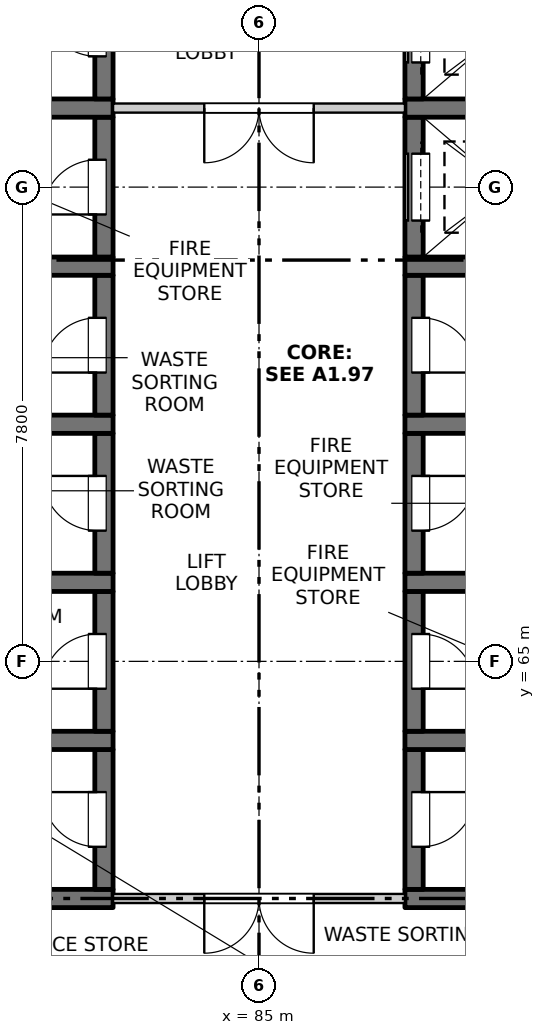
"""IFC4 building model, lengths in metres.
Left out: names, types, materials, properties, quantities, classifications, styles, units other than length and angle.
Written with IfcOpenShell. Run it as: python <this file> out.ifc"""

import sys

from ifc_helpers import new_model, si_unit, direction, frame, frame_2d, origin, place, context, subcontext, project, spatial, rectangle, extrude, element, fill, save


model = new_model("IFC4")
c1 = context("Model", 3, precision=1e-05, world=origin(), true_north=direction((0.0, 1.0)))
c2 = subcontext(c1, "Body", "Model", "MODEL_VIEW")
j1 = project(units=[si_unit("LENGTHUNIT", "METRE"), si_unit("PLANEANGLEUNIT", "RADIAN")], contexts=[c1])
p1 = place(None, origin())
s1 = spatial("IfcSite", under=j1, at=p1, CompositionType="ELEMENT")
p2 = place(p1, origin())
s2 = spatial("IfcBuilding", under=s1, at=p2, CompositionType="ELEMENT")
p3 = place(p2, frame((0.0, 0.0, 182.6)))
s3 = spatial("IfcBuildingStorey", under=s2, at=p3, CompositionType="ELEMENT", Elevation=182.6)
p4 = place(p3, frame((79.6, 61.1, -0.25), z_axis=(0.0, 0.0, 1.0), x_axis=(1.0, 0.0, 0.0)))
e1 = element("IfcWall", 1, at=p4, inside=s3, PredefinedType="SOLIDWALL", context=c2, shape_type="SweptSolid", body=[
    extrude(rectangle(XDim=3.0, YDim=0.3, at=frame_2d((1.5, 0.0))), origin(), (0.0, 0.0, 1.0), 3.4),
])
p5 = place(p3, frame((82.45, 61.25, -0.25), z_axis=(0.0, 0.0, 1.0), x_axis=(0.0, 1.0, 0.0)))
e2 = element("IfcWall", 2, at=p5, inside=s3, PredefinedType="SOLIDWALL", context=c2, shape_type="SweptSolid", body=[
    extrude(rectangle(XDim=2.3, YDim=0.3, at=frame_2d((1.15, 0.0))), origin(), (0.0, 0.0, 1.0), 3.4),
])
p6 = place(p5, frame((0.7, 0.0, 0.25)))
e3 = element("IfcOpeningElement", 3, at=p6, cuts=e2, PredefinedType="OPENING", context=c2, shape_type="SweptSolid", body=[
    extrude(rectangle(XDim=0.9, YDim=2.1, at=frame_2d((0.45, 1.05))), frame((0.0, 0.16, 0.0), z_axis=(0.0, -1.0, 0.0), x_axis=(1.0, 0.0, 0.0)), (0.0, 0.0, 1.0), 0.32),
])
p7 = place(p3, frame((79.6, 63.7, -0.25), z_axis=(0.0, 0.0, 1.0), x_axis=(1.0, 0.0, 0.0)))
e4 = element("IfcWall", 4, at=p7, inside=s3, PredefinedType="SOLIDWALL", context=c2, shape_type="SweptSolid", body=[
    extrude(rectangle(XDim=3.0, YDim=0.3, at=frame_2d((1.5, 0.0))), origin(), (0.0, 0.0, 1.0), 3.4),
])
p8 = place(p3, frame((82.45, 63.85, -0.25), z_axis=(0.0, 0.0, 1.0), x_axis=(0.0, 1.0, 0.0)))
e5 = element("IfcWall", 5, at=p8, inside=s3, PredefinedType="SOLIDWALL", context=c2, shape_type="SweptSolid", body=[
    extrude(rectangle(XDim=2.3, YDim=0.3, at=frame_2d((1.15, 0.0))), origin(), (0.0, 0.0, 1.0), 3.4),
])
p9 = place(p8, frame((0.7, 0.0, 0.25)))
e6 = element("IfcOpeningElement", 6, at=p9, cuts=e5, PredefinedType="OPENING", context=c2, shape_type="SweptSolid", body=[
    extrude(rectangle(XDim=0.9, YDim=2.1, at=frame_2d((0.45, 1.05))), frame((0.0, 0.16, 0.0), z_axis=(0.0, -1.0, 0.0), x_axis=(1.0, 0.0, 0.0)), (0.0, 0.0, 1.0), 0.32),
])
p10 = place(p3, frame((79.6, 66.3, -0.25), z_axis=(0.0, 0.0, 1.0), x_axis=(1.0, 0.0, 0.0)))
e7 = element("IfcWall", 7, at=p10, inside=s3, PredefinedType="SOLIDWALL", context=c2, shape_type="SweptSolid", body=[
    extrude(rectangle(XDim=3.0, YDim=0.3, at=frame_2d((1.5, 0.0))), origin(), (0.0, 0.0, 1.0), 3.4),
])
p11 = place(p3, frame((82.45, 66.45, -0.25), z_axis=(0.0, 0.0, 1.0), x_axis=(0.0, 1.0, 0.0)))
e8 = element("IfcWall", 8, at=p11, inside=s3, PredefinedType="SOLIDWALL", context=c2, shape_type="SweptSolid", body=[
    extrude(rectangle(XDim=2.3, YDim=0.3, at=frame_2d((1.15, 0.0))), origin(), (0.0, 0.0, 1.0), 3.4),
])
p12 = place(p11, frame((0.7, 0.0, 0.25)))
e9 = element("IfcOpeningElement", 9, at=p12, cuts=e8, PredefinedType="OPENING", context=c2, shape_type="SweptSolid", body=[
    extrude(rectangle(XDim=0.9, YDim=2.1, at=frame_2d((0.45, 1.05))), frame((0.0, 0.16, 0.0), z_axis=(0.0, -1.0, 0.0), x_axis=(1.0, 0.0, 0.0)), (0.0, 0.0, 1.0), 0.32),
])
p13 = place(p3, frame((79.6, 68.9, -0.25), z_axis=(0.0, 0.0, 1.0), x_axis=(1.0, 0.0, 0.0)))
e10 = element("IfcWall", 10, at=p13, inside=s3, PredefinedType="SOLIDWALL", context=c2, shape_type="SweptSolid", body=[
    extrude(rectangle(XDim=3.0, YDim=0.3, at=frame_2d((1.5, 0.0))), origin(), (0.0, 0.0, 1.0), 3.4),
])
p14 = place(p3, frame((82.45, 69.05, -0.25), z_axis=(0.0, 0.0, 1.0), x_axis=(0.0, 1.0, 0.0)))
e11 = element("IfcWall", 11, at=p14, inside=s3, PredefinedType="SOLIDWALL", context=c2, shape_type="SweptSolid", body=[
    extrude(rectangle(XDim=2.3, YDim=0.3, at=frame_2d((1.15, 0.0))), origin(), (0.0, 0.0, 1.0), 3.4),
])
p15 = place(p14, frame((0.7, 0.0, 0.25)))
e12 = element("IfcOpeningElement", 12, at=p15, cuts=e11, PredefinedType="OPENING", context=c2, shape_type="SweptSolid", body=[
    extrude(rectangle(XDim=0.9, YDim=2.1, at=frame_2d((0.45, 1.05))), frame((0.0, 0.16, 0.0), z_axis=(0.0, -1.0, 0.0), x_axis=(1.0, 0.0, 0.0)), (0.0, 0.0, 1.0), 0.32),
])
p16 = place(p3, frame((79.6, 71.5, -0.25), z_axis=(0.0, 0.0, 1.0), x_axis=(1.0, 0.0, 0.0)))
e13 = element("IfcWall", 13, at=p16, inside=s3, PredefinedType="SOLIDWALL", context=c2, shape_type="SweptSolid", body=[
    extrude(rectangle(XDim=3.0, YDim=0.3, at=frame_2d((1.5, 0.0))), origin(), (0.0, 0.0, 1.0), 3.4),
])
p17 = place(p3, frame((82.45, 71.65, -0.25), z_axis=(0.0, 0.0, 1.0), x_axis=(0.0, 1.0, 0.0)))
e14 = element("IfcWall", 14, at=p17, inside=s3, PredefinedType="SOLIDWALL", context=c2, shape_type="SweptSolid", body=[
    extrude(rectangle(XDim=2.3, YDim=0.3, at=frame_2d((1.15, 0.0))), origin(), (0.0, 0.0, 1.0), 3.4),
])
p18 = place(p17, frame((0.7, 0.0, 0.25)))
e15 = element("IfcOpeningElement", 15, at=p18, cuts=e14, PredefinedType="OPENING", context=c2, shape_type="SweptSolid", body=[
    extrude(rectangle(XDim=0.9, YDim=2.1, at=frame_2d((0.45, 1.05))), frame((0.0, 0.16, 0.0), z_axis=(0.0, -1.0, 0.0), x_axis=(1.0, 0.0, 0.0)), (0.0, 0.0, 1.0), 0.32),
])
p19 = place(p3, frame((79.6, 74.1, -0.25), z_axis=(0.0, 0.0, 1.0), x_axis=(1.0, 0.0, 0.0)))
e16 = element("IfcWall", 16, at=p19, inside=s3, PredefinedType="SOLIDWALL", context=c2, shape_type="SweptSolid", body=[
    extrude(rectangle(XDim=3.0, YDim=0.3, at=frame_2d((1.5, 0.0))), origin(), (0.0, 0.0, 1.0), 3.4),
])
p20 = place(p3, frame((82.45, 74.25, -0.25), z_axis=(0.0, 0.0, 1.0), x_axis=(0.0, 1.0, 0.0)))
e17 = element("IfcWall", 17, at=p20, inside=s3, PredefinedType="SOLIDWALL", context=c2, shape_type="SweptSolid", body=[
    extrude(rectangle(XDim=2.3, YDim=0.3, at=frame_2d((1.15, 0.0))), origin(), (0.0, 0.0, 1.0), 3.4),
])
p21 = place(p20, frame((0.7, 0.0, 0.25)))
e18 = element("IfcOpeningElement", 18, at=p21, cuts=e17, PredefinedType="OPENING", context=c2, shape_type="SweptSolid", body=[
    extrude(rectangle(XDim=0.9, YDim=2.1, at=frame_2d((0.45, 1.05))), frame((0.0, 0.16, 0.0), z_axis=(0.0, -1.0, 0.0), x_axis=(1.0, 0.0, 0.0)), (0.0, 0.0, 1.0), 0.32),
])
p22 = place(p3, frame((87.4, 61.1, -0.25), z_axis=(0.0, 0.0, 1.0), x_axis=(1.0, 0.0, 0.0)))
e19 = element("IfcWall", 19, at=p22, inside=s3, PredefinedType="SOLIDWALL", context=c2, shape_type="SweptSolid", body=[
    extrude(rectangle(XDim=3.0, YDim=0.3, at=frame_2d((1.5, 0.0))), origin(), (0.0, 0.0, 1.0), 3.4),
])
p23 = place(p3, frame((87.55, 61.25, -0.25), z_axis=(0.0, 0.0, 1.0), x_axis=(0.0, 1.0, 0.0)))
e20 = element("IfcWall", 20, at=p23, inside=s3, PredefinedType="SOLIDWALL", context=c2, shape_type="SweptSolid", body=[
    extrude(rectangle(XDim=2.3, YDim=0.3, at=frame_2d((1.15, 0.0))), origin(), (0.0, 0.0, 1.0), 3.4),
])
p24 = place(p23, frame((0.7, 0.0, 0.25)))
e21 = element("IfcOpeningElement", 21, at=p24, cuts=e20, PredefinedType="OPENING", context=c2, shape_type="SweptSolid", body=[
    extrude(rectangle(XDim=0.9, YDim=2.1, at=frame_2d((0.45, 1.05))), frame((0.0, 0.16, 0.0), z_axis=(0.0, -1.0, 0.0), x_axis=(1.0, 0.0, 0.0)), (0.0, 0.0, 1.0), 0.32),
])
p25 = place(p3, frame((87.4, 63.7, -0.25), z_axis=(0.0, 0.0, 1.0), x_axis=(1.0, 0.0, 0.0)))
e22 = element("IfcWall", 22, at=p25, inside=s3, PredefinedType="SOLIDWALL", context=c2, shape_type="SweptSolid", body=[
    extrude(rectangle(XDim=3.0, YDim=0.3, at=frame_2d((1.5, 0.0))), origin(), (0.0, 0.0, 1.0), 3.4),
])
p26 = place(p3, frame((87.55, 63.85, -0.25), z_axis=(0.0, 0.0, 1.0), x_axis=(0.0, 1.0, 0.0)))
e23 = element("IfcWall", 23, at=p26, inside=s3, PredefinedType="SOLIDWALL", context=c2, shape_type="SweptSolid", body=[
    extrude(rectangle(XDim=2.3, YDim=0.3, at=frame_2d((1.15, 0.0))), origin(), (0.0, 0.0, 1.0), 3.4),
])
p27 = place(p26, frame((0.7, 0.0, 0.25)))
e24 = element("IfcOpeningElement", 24, at=p27, cuts=e23, PredefinedType="OPENING", context=c2, shape_type="SweptSolid", body=[
    extrude(rectangle(XDim=0.9, YDim=2.1, at=frame_2d((0.45, 1.05))), frame((0.0, 0.16, 0.0), z_axis=(0.0, -1.0, 0.0), x_axis=(1.0, 0.0, 0.0)), (0.0, 0.0, 1.0), 0.32),
])
p28 = place(p3, frame((87.4, 66.3, -0.25), z_axis=(0.0, 0.0, 1.0), x_axis=(1.0, 0.0, 0.0)))
e25 = element("IfcWall", 25, at=p28, inside=s3, PredefinedType="SOLIDWALL", context=c2, shape_type="SweptSolid", body=[
    extrude(rectangle(XDim=3.0, YDim=0.3, at=frame_2d((1.5, 0.0))), origin(), (0.0, 0.0, 1.0), 3.4),
])
p29 = place(p3, frame((87.55, 66.45, -0.25), z_axis=(0.0, 0.0, 1.0), x_axis=(0.0, 1.0, 0.0)))
e26 = element("IfcWall", 26, at=p29, inside=s3, PredefinedType="SOLIDWALL", context=c2, shape_type="SweptSolid", body=[
    extrude(rectangle(XDim=2.3, YDim=0.3, at=frame_2d((1.15, 0.0))), origin(), (0.0, 0.0, 1.0), 3.4),
])
p30 = place(p29, frame((0.7, 0.0, 0.25)))
e27 = element("IfcOpeningElement", 27, at=p30, cuts=e26, PredefinedType="OPENING", context=c2, shape_type="SweptSolid", body=[
    extrude(rectangle(XDim=0.9, YDim=2.1, at=frame_2d((0.45, 1.05))), frame((0.0, 0.16, 0.0), z_axis=(0.0, -1.0, 0.0), x_axis=(1.0, 0.0, 0.0)), (0.0, 0.0, 1.0), 0.32),
])
p31 = place(p3, frame((87.4, 68.9, -0.25), z_axis=(0.0, 0.0, 1.0), x_axis=(1.0, 0.0, 0.0)))
e28 = element("IfcWall", 28, at=p31, inside=s3, PredefinedType="SOLIDWALL", context=c2, shape_type="SweptSolid", body=[
    extrude(rectangle(XDim=3.0, YDim=0.3, at=frame_2d((1.5, 0.0))), origin(), (0.0, 0.0, 1.0), 3.4),
])
p32 = place(p3, frame((87.55, 69.05, -0.25), z_axis=(0.0, 0.0, 1.0), x_axis=(0.0, 1.0, 0.0)))
e29 = element("IfcWall", 29, at=p32, inside=s3, PredefinedType="SOLIDWALL", context=c2, shape_type="SweptSolid", body=[
    extrude(rectangle(XDim=2.3, YDim=0.3, at=frame_2d((1.15, 0.0))), origin(), (0.0, 0.0, 1.0), 3.4),
])
p33 = place(p32, frame((0.7, 0.0, 0.25)))
e30 = element("IfcOpeningElement", 30, at=p33, cuts=e29, PredefinedType="OPENING", context=c2, shape_type="SweptSolid", body=[
    extrude(rectangle(XDim=0.9, YDim=2.1, at=frame_2d((0.45, 1.05))), frame((0.0, 0.16, 0.0), z_axis=(0.0, -1.0, 0.0), x_axis=(1.0, 0.0, 0.0)), (0.0, 0.0, 1.0), 0.32),
])
p34 = place(p3, frame((87.4, 71.5, -0.25), z_axis=(0.0, 0.0, 1.0), x_axis=(1.0, 0.0, 0.0)))
e31 = element("IfcWall", 31, at=p34, inside=s3, PredefinedType="SOLIDWALL", context=c2, shape_type="SweptSolid", body=[
    extrude(rectangle(XDim=3.0, YDim=0.3, at=frame_2d((1.5, 0.0))), origin(), (0.0, 0.0, 1.0), 3.4),
])
p35 = place(p3, frame((87.55, 71.65, -0.25), z_axis=(0.0, 0.0, 1.0), x_axis=(0.0, 1.0, 0.0)))
e32 = element("IfcWall", 32, at=p35, inside=s3, PredefinedType="SOLIDWALL", context=c2, shape_type="SweptSolid", body=[
    extrude(rectangle(XDim=2.3, YDim=0.3, at=frame_2d((1.15, 0.0))), origin(), (0.0, 0.0, 1.0), 3.4),
])
p36 = place(p35, frame((0.6, 0.0, 0.25)))
e33 = element("IfcOpeningElement", 33, at=p36, cuts=e32, PredefinedType="OPENING", context=c2, shape_type="SweptSolid", body=[
    extrude(rectangle(XDim=1.1, YDim=2.1, at=frame_2d((0.55, 1.05))), frame((0.0, 0.16, 0.0), z_axis=(0.0, -1.0, 0.0), x_axis=(1.0, 0.0, 0.0)), (0.0, 0.0, 1.0), 0.32),
])
p37 = place(p3, frame((87.4, 74.1, -0.25), z_axis=(0.0, 0.0, 1.0), x_axis=(1.0, 0.0, 0.0)))
e34 = element("IfcWall", 34, at=p37, inside=s3, PredefinedType="SOLIDWALL", context=c2, shape_type="SweptSolid", body=[
    extrude(rectangle(XDim=3.0, YDim=0.3, at=frame_2d((1.5, 0.0))), origin(), (0.0, 0.0, 1.0), 3.4),
])
p38 = place(p3, frame((87.55, 74.25, -0.25), z_axis=(0.0, 0.0, 1.0), x_axis=(0.0, 1.0, 0.0)))
e35 = element("IfcWall", 35, at=p38, inside=s3, PredefinedType="SOLIDWALL", context=c2, shape_type="SweptSolid", body=[
    extrude(rectangle(XDim=2.3, YDim=0.3, at=frame_2d((1.15, 0.0))), origin(), (0.0, 0.0, 1.0), 3.4),
])
p39 = place(p38, frame((0.6, 0.0, 0.25)))
e36 = element("IfcOpeningElement", 36, at=p39, cuts=e35, PredefinedType="OPENING", context=c2, shape_type="SweptSolid", body=[
    extrude(rectangle(XDim=1.1, YDim=2.1, at=frame_2d((0.55, 1.05))), frame((0.0, 0.16, 0.0), z_axis=(0.0, -1.0, 0.0), x_axis=(1.0, 0.0, 0.0)), (0.0, 0.0, 1.0), 0.32),
])
p40 = place(p3, frame((82.6, 61.1, 0.0), z_axis=(0.0, 0.0, 1.0), x_axis=(1.0, 0.0, 0.0)))
e37 = element("IfcWall", 37, at=p40, inside=s3, PredefinedType="PARTITIONING", context=c2, shape_type="SweptSolid", body=[
    extrude(rectangle(XDim=4.8, YDim=0.15, at=frame_2d((2.4, 0.0))), origin(), (0.0, 0.0, 1.0), 3.15),
])
p41 = place(p40, frame((1.5, 0.0, 0.0)))
e38 = element("IfcOpeningElement", 38, at=p41, cuts=e37, PredefinedType="OPENING", context=c2, shape_type="SweptSolid", body=[
    extrude(rectangle(XDim=1.8, YDim=2.1, at=frame_2d((0.9, 1.05))), frame((0.0, 0.085, 0.0), z_axis=(0.0, -1.0, 0.0), x_axis=(1.0, 0.0, 0.0)), (0.0, 0.0, 1.0), 0.17),
])
p42 = place(p3, frame((82.6, 74.1, 0.0), z_axis=(0.0, 0.0, 1.0), x_axis=(1.0, 0.0, 0.0)))
e39 = element("IfcWall", 39, at=p42, inside=s3, PredefinedType="PARTITIONING", context=c2, shape_type="SweptSolid", body=[
    extrude(rectangle(XDim=4.8, YDim=0.15, at=frame_2d((2.4, 0.0))), origin(), (0.0, 0.0, 1.0), 3.15),
])
p43 = place(p42, frame((1.5, 0.0, 0.0)))
e40 = element("IfcOpeningElement", 40, at=p43, cuts=e39, PredefinedType="OPENING", context=c2, shape_type="SweptSolid", body=[
    extrude(rectangle(XDim=1.8, YDim=2.1, at=frame_2d((0.9, 1.05))), frame((0.0, 0.085, 0.0), z_axis=(0.0, -1.0, 0.0), x_axis=(1.0, 0.0, 0.0)), (0.0, 0.0, 1.0), 0.17),
])
p44 = place(p41, origin())
e41 = element("IfcDoor", 41, at=p44, inside=s3, OperationType="DOUBLE_DOOR_SINGLE_SWING", PredefinedType="DOOR", context=c2, shape_type="SweptSolid", body=[
    extrude(rectangle(XDim=1.8, YDim=2.1, at=frame_2d((0.9, 1.05))), frame((0.0, 0.025, 0.0), z_axis=(0.0, -1.0, 0.0), x_axis=(1.0, 0.0, 0.0)), (0.0, 0.0, 1.0), 0.05),
])
fill(e38, e41)
p45 = place(p6, origin())
e42 = element("IfcDoor", 42, at=p45, inside=s3, OperationType="SINGLE_SWING_RIGHT", PredefinedType="DOOR", context=c2, shape_type="SweptSolid", body=[
    extrude(rectangle(XDim=0.9, YDim=2.1, at=frame_2d((0.45, 1.05))), frame((0.0, 0.135, 0.0), z_axis=(0.0, -1.0, 0.0), x_axis=(1.0, 0.0, 0.0)), (0.0, 0.0, 1.0), 0.05),
])
fill(e3, e42)
p46 = place(p24, origin())
e43 = element("IfcDoor", 43, at=p46, inside=s3, OperationType="SINGLE_SWING_LEFT", PredefinedType="DOOR", context=c2, shape_type="SweptSolid", body=[
    extrude(rectangle(XDim=0.9, YDim=2.1, at=frame_2d((0.45, 1.05))), frame((0.0, -0.085, 0.0), z_axis=(0.0, -1.0, 0.0), x_axis=(1.0, 0.0, 0.0)), (0.0, 0.0, 1.0), 0.05),
])
fill(e21, e43)
p47 = place(p9, origin())
e44 = element("IfcDoor", 44, at=p47, inside=s3, OperationType="SINGLE_SWING_LEFT", PredefinedType="DOOR", context=c2, shape_type="SweptSolid", body=[
    extrude(rectangle(XDim=0.9, YDim=2.1, at=frame_2d((0.45, 1.05))), frame((0.0, 0.135, 0.0), z_axis=(0.0, -1.0, 0.0), x_axis=(1.0, 0.0, 0.0)), (0.0, 0.0, 1.0), 0.05),
])
fill(e6, e44)
p48 = place(p27, origin())
e45 = element("IfcDoor", 45, at=p48, inside=s3, OperationType="SINGLE_SWING_RIGHT", PredefinedType="DOOR", context=c2, shape_type="SweptSolid", body=[
    extrude(rectangle(XDim=0.9, YDim=2.1, at=frame_2d((0.45, 1.05))), frame((0.0, -0.085, 0.0), z_axis=(0.0, -1.0, 0.0), x_axis=(1.0, 0.0, 0.0)), (0.0, 0.0, 1.0), 0.05),
])
fill(e24, e45)
p49 = place(p12, origin())
e46 = element("IfcDoor", 46, at=p49, inside=s3, OperationType="SINGLE_SWING_RIGHT", PredefinedType="DOOR", context=c2, shape_type="SweptSolid", body=[
    extrude(rectangle(XDim=0.9, YDim=2.1, at=frame_2d((0.45, 1.05))), frame((0.0, 0.135, 0.0), z_axis=(0.0, -1.0, 0.0), x_axis=(1.0, 0.0, 0.0)), (0.0, 0.0, 1.0), 0.05),
])
fill(e9, e46)
p50 = place(p30, origin())
e47 = element("IfcDoor", 47, at=p50, inside=s3, OperationType="SINGLE_SWING_LEFT", PredefinedType="DOOR", context=c2, shape_type="SweptSolid", body=[
    extrude(rectangle(XDim=0.9, YDim=2.1, at=frame_2d((0.45, 1.05))), frame((0.0, -0.085, 0.0), z_axis=(0.0, -1.0, 0.0), x_axis=(1.0, 0.0, 0.0)), (0.0, 0.0, 1.0), 0.05),
])
fill(e27, e47)
p51 = place(p15, origin())
e48 = element("IfcDoor", 48, at=p51, inside=s3, OperationType="SINGLE_SWING_LEFT", PredefinedType="DOOR", context=c2, shape_type="SweptSolid", body=[
    extrude(rectangle(XDim=0.9, YDim=2.1, at=frame_2d((0.45, 1.05))), frame((0.0, 0.135, 0.0), z_axis=(0.0, -1.0, 0.0), x_axis=(1.0, 0.0, 0.0)), (0.0, 0.0, 1.0), 0.05),
])
fill(e12, e48)
p52 = place(p33, origin())
e49 = element("IfcDoor", 49, at=p52, inside=s3, OperationType="SINGLE_SWING_RIGHT", PredefinedType="DOOR", context=c2, shape_type="SweptSolid", body=[
    extrude(rectangle(XDim=0.9, YDim=2.1, at=frame_2d((0.45, 1.05))), frame((0.0, -0.085, 0.0), z_axis=(0.0, -1.0, 0.0), x_axis=(1.0, 0.0, 0.0)), (0.0, 0.0, 1.0), 0.05),
])
fill(e30, e49)
p53 = place(p18, origin())
e50 = element("IfcDoor", 50, at=p53, inside=s3, OperationType="SINGLE_SWING_LEFT", PredefinedType="DOOR", context=c2, shape_type="SweptSolid", body=[
    extrude(rectangle(XDim=0.9, YDim=2.1, at=frame_2d((0.45, 1.05))), frame((0.0, 0.135, 0.0), z_axis=(0.0, -1.0, 0.0), x_axis=(1.0, 0.0, 0.0)), (0.0, 0.0, 1.0), 0.05),
])
fill(e15, e50)
p54 = place(p36, origin())
e51 = element("IfcDoor", 51, at=p54, inside=s3, OperationType="SLIDING_TO_LEFT", PredefinedType="DOOR", context=c2, shape_type="SweptSolid", body=[
    extrude(rectangle(XDim=1.1, YDim=2.1, at=frame_2d((0.55, 1.05))), frame((0.0, -0.085, 0.0), z_axis=(0.0, -1.0, 0.0), x_axis=(1.0, 0.0, 0.0)), (0.0, 0.0, 1.0), 0.05),
])
fill(e33, e51)
p55 = place(p43, origin())
e52 = element("IfcDoor", 52, at=p55, inside=s3, OperationType="DOUBLE_DOOR_SINGLE_SWING", PredefinedType="DOOR", context=c2, shape_type="SweptSolid", body=[
    extrude(rectangle(XDim=1.8, YDim=2.1, at=frame_2d((0.9, 1.05))), frame((0.0, 0.025, 0.0), z_axis=(0.0, -1.0, 0.0), x_axis=(1.0, 0.0, 0.0)), (0.0, 0.0, 1.0), 0.05),
])
fill(e40, e52)
p56 = place(p21, origin())
e53 = element("IfcDoor", 53, at=p56, inside=s3, OperationType="SINGLE_SWING_RIGHT", PredefinedType="DOOR", context=c2, shape_type="SweptSolid", body=[
    extrude(rectangle(XDim=0.9, YDim=2.1, at=frame_2d((0.45, 1.05))), frame((0.0, 0.135, 0.0), z_axis=(0.0, -1.0, 0.0), x_axis=(1.0, 0.0, 0.0)), (0.0, 0.0, 1.0), 0.05),
])
fill(e18, e53)
p57 = place(p39, origin())
e54 = element("IfcDoor", 54, at=p57, inside=s3, OperationType="SLIDING_TO_LEFT", PredefinedType="DOOR", context=c2, shape_type="SweptSolid", body=[
    extrude(rectangle(XDim=1.1, YDim=2.1, at=frame_2d((0.55, 1.05))), frame((0.0, -0.085, 0.0), z_axis=(0.0, -1.0, 0.0), x_axis=(1.0, 0.0, 0.0)), (0.0, 0.0, 1.0), 0.05),
])
fill(e36, e54)
save(model, sys.argv[1])
